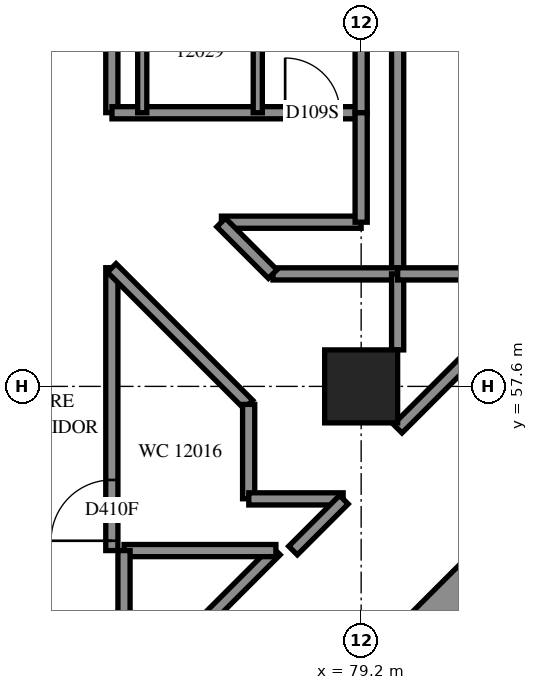
"""IFC4 building model, lengths in metres.
Left out: names, types, materials, properties, quantities, classifications, styles, units other than length and angle.
Written with IfcOpenShell. Run it as: python <this file> out.ifc"""

import sys

from ifc_helpers import new_model, si_unit, direction, frame, frame_2d, origin, origin_2d, place, context, subcontext, project, spatial, rectangle, extrude, element, fill, save


model = new_model("IFC4")
c1 = context("Model", 3, precision=1e-05, world=origin(), true_north=direction((0.0, 1.0)))
c2 = subcontext(c1, "Body", "Model", "MODEL_VIEW")
j1 = project(units=[si_unit("LENGTHUNIT", "METRE"), si_unit("PLANEANGLEUNIT", "RADIAN")], contexts=[c1])
p1 = place(None, origin())
s1 = spatial("IfcSite", under=j1, at=p1, CompositionType="ELEMENT")
p2 = place(p1, origin())
s2 = spatial("IfcBuilding", under=s1, at=p2, CompositionType="ELEMENT")
p3 = place(p2, frame((0.0, 0.0, 47.4)))
s3 = spatial("IfcBuildingStorey", under=s2, at=p3, CompositionType="ELEMENT", Elevation=47.4)
p4 = place(p3, frame((79.2, 57.6, 0.0), z_axis=(0.0, 0.0, 1.0), x_axis=(1.0, 0.0, 0.0)))
e1 = element("IfcColumn", 1, at=p4, inside=s3, PredefinedType="COLUMN", context=c2, shape_type="SweptSolid", body=[
    extrude(rectangle(XDim=1.2, YDim=1.2, at=origin_2d()), origin(), (0.0, 0.0, 1.0), 3.1),
])
p5 = place(p3, frame((76.301, 49.443, -0.3), z_axis=(0.0, 0.0, 1.0), x_axis=(0.7071067812, 0.7071067812, 0.0)))
e2 = element("IfcWall", 2, at=p5, inside=s3, PredefinedType="SHEAR", context=c2, shape_type="SweptSolid", body=[
    extrude(rectangle(XDim=14.4, YDim=1.0, at=frame_2d((7.2, 0.0))), origin(), (0.0, 0.0, 1.0), 2.7),
])
p6 = place(p5, frame((4.55, 0.0, 0.3)))
e3 = element("IfcOpeningElement", 3, at=p6, cuts=e2, PredefinedType="OPENING", context=c2, shape_type="SweptSolid", body=[
    extrude(rectangle(XDim=1.1, YDim=2.1, at=frame_2d((0.55, 1.05))), frame((0.0, 0.51, 0.0), z_axis=(0.0, -1.0, 0.0), x_axis=(1.0, 0.0, 0.0)), (0.0, 0.0, 1.0), 1.02),
])
p7 = place(p5, frame((11.35, 0.0, 0.3)))
e4 = element("IfcOpeningElement", 4, at=p7, cuts=e2, PredefinedType="OPENING", context=c2, shape_type="SweptSolid", body=[
    extrude(rectangle(XDim=1.1, YDim=2.1, at=frame_2d((0.55, 1.05))), frame((0.0, 0.51, 0.0), z_axis=(0.0, -1.0, 0.0), x_axis=(1.0, 0.0, 0.0)), (0.0, 0.0, 1.0), 1.02),
])
p8 = place(p3, frame((75.1, 62.102, 0.0), z_axis=(0.0, 0.0, 1.0), x_axis=(0.0, 1.0, 0.0)))
e5 = element("IfcWall", 5, at=p8, inside=s3, PredefinedType="PARTITIONING", context=c2, shape_type="SweptSolid", body=[
    extrude(rectangle(XDim=5.798, YDim=0.2, at=frame_2d((2.899, 0.0))), origin(), (0.0, 0.0, 1.0), 3.1),
])
p9 = place(p3, frame((79.8, 59.45, 0.0), z_axis=(0.0, 0.0, 1.0), x_axis=(0.0, 1.0, 0.0)))
e6 = element("IfcWall", 6, at=p9, inside=s3, PredefinedType="PARTITIONING", context=c2, shape_type="SweptSolid", body=[
    extrude(rectangle(XDim=4.75, YDim=0.2, at=frame_2d((2.375, 0.0))), origin(), (0.0, 0.0, 1.0), 3.1),
])
p10 = place(p3, frame((75.1, 54.9, 0.0), z_axis=(0.0, 0.0, 1.0), x_axis=(0.0, 1.0, 0.0)))
e7 = element("IfcWall", 7, at=p10, inside=s3, PredefinedType="PARTITIONING", context=c2, shape_type="SweptSolid", body=[
    extrude(rectangle(XDim=4.652, YDim=0.2, at=frame_2d((2.326, 0.0))), origin(), (0.0, 0.0, 1.0), 3.1),
])
p11 = place(p10, frame((0.161, 0.0, 0.0)))
e8 = element("IfcOpeningElement", 8, at=p11, cuts=e7, PredefinedType="OPENING", context=c2, shape_type="SweptSolid", body=[
    extrude(rectangle(XDim=1.0, YDim=2.1, at=frame_2d((0.5, 1.05))), frame((0.0, 0.11, 0.0), z_axis=(0.0, -1.0, 0.0), x_axis=(1.0, 0.0, 0.0)), (0.0, 0.0, 1.0), 0.22),
])
p12 = place(p3, frame((75.102, 62.1, 0.0), z_axis=(0.0, 0.0, 1.0), x_axis=(1.0, 0.0, 0.0)))
e9 = element("IfcWall", 9, at=p12, inside=s3, PredefinedType="PARTITIONING", context=c2, shape_type="SweptSolid", body=[
    extrude(rectangle(XDim=4.098, YDim=0.2, at=frame_2d((2.049, 0.0))), origin(), (0.0, 0.0, 1.0), 3.1),
])
p13 = place(p12, frame((2.848, 0.0, 0.0)))
e10 = element("IfcOpeningElement", 10, at=p13, cuts=e9, PredefinedType="OPENING", context=c2, shape_type="SweptSolid", body=[
    extrude(rectangle(XDim=0.9, YDim=2.1, at=frame_2d((0.45, 1.05))), frame((0.0, 0.11, 0.0), z_axis=(0.0, -1.0, 0.0), x_axis=(1.0, 0.0, 0.0)), (0.0, 0.0, 1.0), 0.22),
])
p14 = place(p3, frame((75.099, 59.549, 0.0), z_axis=(0.0, 0.0, 1.0), x_axis=(0.7071067812, -0.7071067812, 0.0)))
e11 = element("IfcWall", 11, at=p14, inside=s3, PredefinedType="PARTITIONING", context=c2, shape_type="SweptSolid", body=[
    extrude(rectangle(XDim=3.179, YDim=0.2, at=frame_2d((1.59, 0.0))), origin(), (0.0, 0.0, 1.0), 3.1),
])
p15 = place(p3, frame((75.997, 53.101, 0.0), z_axis=(0.0, 0.0, 1.0), x_axis=(0.7071067812, 0.7071067812, 0.0)))
e12 = element("IfcWall", 12, at=p15, inside=s3, PredefinedType="PARTITIONING", context=c2, shape_type="SweptSolid", body=[
    extrude(rectangle(XDim=2.546, YDim=0.2, at=frame_2d((1.273, 0.0))), origin(), (0.0, 0.0, 1.0), 3.1),
])
p16 = place(p3, frame((75.3, 54.9, 0.0), z_axis=(0.0, 0.0, 1.0), x_axis=(1.0, 0.0, 0.0)))
e13 = element("IfcWall", 13, at=p16, inside=s3, PredefinedType="PARTITIONING", context=c2, shape_type="SweptSolid", body=[
    extrude(rectangle(XDim=2.498, YDim=0.2, at=frame_2d((1.249, 0.0))), origin(), (0.0, 0.0, 1.0), 3.1),
])
for number, where, z_axis, x_axis in (
    (14, (75.6, 62.1, 0.0), (0.0, 0.0, 1.0), (0.0, 1.0, 0.0)),
    (15, (77.5, 62.1, 0.0), (0.0, 0.0, 1.0), (0.0, 1.0, 0.0)),
):
    element("IfcWall", number, at=place(p3, frame(where, z_axis=z_axis, x_axis=x_axis)), inside=s3, PredefinedType="PARTITIONING", context=c2, shape_type="SweptSolid", body=[
        extrude(rectangle(XDim=2.4, YDim=0.15, at=frame_2d((1.2, 0.0))), origin(), (0.0, 0.0, 1.0), 3.1),
    ])
p17 = place(p3, frame((76.902, 60.3, 0.0), z_axis=(0.0, 0.0, 1.0), x_axis=(1.0, 0.0, 0.0)))
e16 = element("IfcWall", 16, at=p17, inside=s3, PredefinedType="PARTITIONING", context=c2, shape_type="SweptSolid", body=[
    extrude(rectangle(XDim=2.298, YDim=0.2, at=frame_2d((1.149, 0.0))), origin(), (0.0, 0.0, 1.0), 3.1),
])
p18 = place(p3, frame((79.2, 62.1, 0.0), z_axis=(0.0, 0.0, 1.0), x_axis=(0.0, 1.0, 0.0)))
e17 = element("IfcWall", 17, at=p18, inside=s3, PredefinedType="PARTITIONING", context=c2, shape_type="SweptSolid", body=[
    extrude(rectangle(XDim=2.1, YDim=0.2, at=frame_2d((1.05, 0.0))), origin(), (0.0, 0.0, 1.0), 3.1),
])
p19 = place(p3, frame((77.75, 59.45, 0.0), z_axis=(0.0, 0.0, 1.0), x_axis=(1.0, 0.0, 0.0)))
e18 = element("IfcWall", 18, at=p19, inside=s3, PredefinedType="PARTITIONING", context=c2, shape_type="SweptSolid", body=[
    extrude(rectangle(XDim=2.05, YDim=0.2, at=frame_2d((1.025, 0.0))), origin(), (0.0, 0.0, 1.0), 3.1),
])
for number, where, z_axis, x_axis in (
    (19, (79.2, 60.3, 0.0), (0.0, 0.0, 1.0), (0.0, 1.0, 0.0)),
    (20, (75.3, 53.1, 0.0), (0.0, 0.0, 1.0), (0.0, 1.0, 0.0)),
):
    element("IfcWall", number, at=place(p3, frame(where, z_axis=z_axis, x_axis=x_axis)), inside=s3, PredefinedType="PARTITIONING", context=c2, shape_type="SweptSolid", body=[
        extrude(rectangle(XDim=1.8, YDim=0.2, at=frame_2d((0.9, 0.0))), origin(), (0.0, 0.0, 1.0), 3.1),
    ])
p20 = place(p3, frame((79.801, 56.905, 0.0), z_axis=(0.0, 0.0, 1.0), x_axis=(0.7071067812, 0.7071067812, 0.0)))
e21 = element("IfcWall", 21, at=p20, inside=s3, PredefinedType="PARTITIONING", context=c2, shape_type="SweptSolid", body=[
    extrude(rectangle(XDim=1.765, YDim=0.2, at=frame_2d((0.882, 0.0))), origin(), (0.0, 0.0, 1.0), 3.1),
])
for number, where, z_axis, x_axis in (
    (22, (77.35, 55.752, 0.0), (0.0, 0.0, 1.0), (0.0, 1.0, 0.0)),
    (23, (77.352, 55.75, 0.0), (0.0, 0.0, 1.0), (1.0, 0.0, 0.0)),
):
    element("IfcWall", number, at=place(p3, frame(where, z_axis=z_axis, x_axis=x_axis)), inside=s3, PredefinedType="PARTITIONING", context=c2, shape_type="SweptSolid", body=[
        extrude(rectangle(XDim=1.552, YDim=0.2, at=frame_2d((0.776, 0.0))), origin(), (0.0, 0.0, 1.0), 3.1),
    ])
p21 = place(p3, frame((79.8, 58.2, 0.0), z_axis=(0.0, 0.0, 1.0), x_axis=(0.0, 1.0, 0.0)))
e24 = element("IfcWall", 24, at=p21, inside=s3, PredefinedType="PARTITIONING", context=c2, shape_type="SweptSolid", body=[
    extrude(rectangle(XDim=1.25, YDim=0.2, at=frame_2d((0.625, 0.0))), origin(), (0.0, 0.0, 1.0), 3.1),
])
p22 = place(p3, frame((79.8, 59.45, 0.0), z_axis=(0.0, 0.0, 1.0), x_axis=(1.0, 0.0, 0.0)))
e25 = element("IfcWall", 25, at=p22, inside=s3, PredefinedType="PARTITIONING", context=c2, shape_type="SweptSolid", body=[
    extrude(rectangle(XDim=1.248, YDim=0.2, at=frame_2d((0.624, 0.0))), origin(), (0.0, 0.0, 1.0), 3.1),
])
p23 = place(p3, frame((76.897, 60.295, 0.0), z_axis=(0.0, 0.0, 1.0), x_axis=(0.7071067812, -0.7071067812, 0.0)))
e26 = element("IfcWall", 26, at=p23, inside=s3, PredefinedType="PARTITIONING", context=c2, shape_type="SweptSolid", body=[
    extrude(rectangle(XDim=1.199, YDim=0.2, at=frame_2d((0.6, 0.0))), origin(), (0.0, 0.0, 1.0), 3.1),
])
p24 = place(p3, frame((78.079, 54.901, 0.0), z_axis=(0.0, 0.0, 1.0), x_axis=(0.7071067812, 0.7071067812, 0.0)))
e27 = element("IfcWall", 27, at=p24, inside=s3, PredefinedType="PARTITIONING", context=c2, shape_type="SweptSolid", body=[
    extrude(rectangle(XDim=1.182, YDim=0.2, at=frame_2d((0.591, 0.0))), origin(), (0.0, 0.0, 1.0), 3.1),
])
p25 = place(p11, origin())
e28 = element("IfcDoor", 28, at=p25, inside=s3, OperationType="SINGLE_SWING_LEFT", PredefinedType="DOOR", context=c2, shape_type="SweptSolid", body=[
    extrude(rectangle(XDim=1.0, YDim=2.1, at=frame_2d((0.5, 1.05))), frame((0.0, 0.025, 0.0), z_axis=(0.0, -1.0, 0.0), x_axis=(1.0, 0.0, 0.0)), (0.0, 0.0, 1.0), 0.05),
])
fill(e8, e28)
p26 = place(p13, origin())
e29 = element("IfcDoor", 29, at=p26, inside=s3, OperationType="SINGLE_SWING_LEFT", PredefinedType="DOOR", context=c2, shape_type="SweptSolid", body=[
    extrude(rectangle(XDim=0.9, YDim=2.1, at=frame_2d((0.45, 1.05))), frame((0.0, 0.025, 0.0), z_axis=(0.0, -1.0, 0.0), x_axis=(1.0, 0.0, 0.0)), (0.0, 0.0, 1.0), 0.05),
])
fill(e10, e29)
save(model, sys.argv[1])
